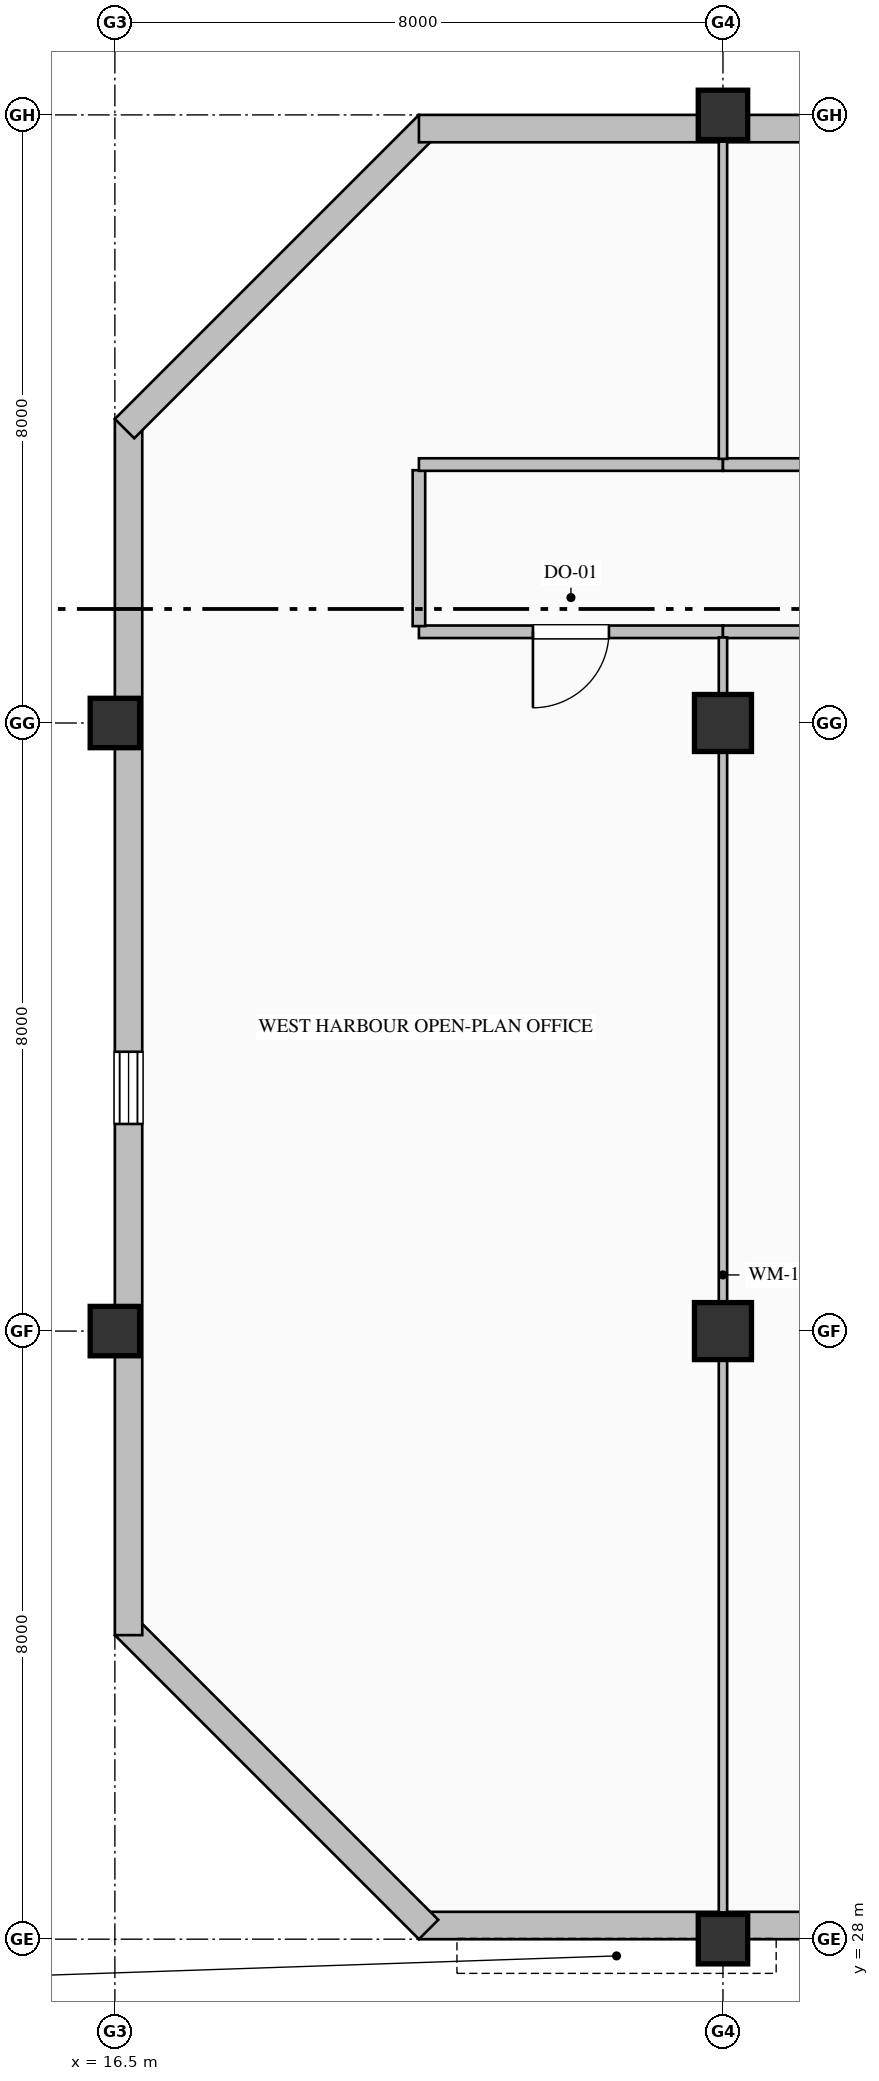
"""IFC4 building model, lengths in metres.
Left out: names, types, materials, properties, quantities, classifications, styles, units other than length and angle.
Written with IfcOpenShell. Run it as: python <this file> out.ifc"""

import sys

from ifc_helpers import new_model, si_unit, direction, frame, frame_2d, origin, origin_2d, place, context, subcontext, project, spatial, rectangle, hollow_rectangle, extrude, element, fill, save


model = new_model("IFC4")
c1 = context("Model", 3, precision=1e-05, world=origin(), true_north=direction((0.0, 1.0)))
c2 = subcontext(c1, "Body", "Model", "MODEL_VIEW")
j1 = project(units=[si_unit("LENGTHUNIT", "METRE"), si_unit("PLANEANGLEUNIT", "RADIAN")], contexts=[c1])
p1 = place(None, origin())
s1 = spatial("IfcSite", under=j1, at=p1, CompositionType="ELEMENT")
p2 = place(p1, origin())
s2 = spatial("IfcBuilding", under=s1, at=p2, CompositionType="ELEMENT")
p3 = place(p2, frame((0.0, 0.0, 319.2)))
s3 = spatial("IfcBuildingStorey", under=s2, at=p3, CompositionType="ELEMENT", Elevation=319.2)
for number, where, z_axis, x_axis in (
    (1, (16.5, 36.0, 0.0), (0.0, 0.0, 1.0), (1.0, 0.0, 0.0)),
    (2, (16.5, 44.0, 0.0), (0.0, 0.0, 1.0), (1.0, 0.0, 0.0)),
    (3, (24.5, 28.0, 0.0), (0.0, 0.0, 1.0), (1.0, 0.0, 0.0)),
):
    element("IfcColumn", number, at=place(p3, frame(where, z_axis=z_axis, x_axis=x_axis)), inside=s3, PredefinedType="COLUMN", context=c2, shape_type="SweptSolid", body=[
        extrude(hollow_rectangle(XDim=0.65, YDim=0.65, WallThickness=0.028, at=origin_2d()), origin(), (0.0, 0.0, 1.0), 4.0),
    ])
for number, where, z_axis, x_axis in (
    (4, (24.5, 36.0, 0.0), (0.0, 0.0, 1.0), (1.0, 0.0, 0.0)),
    (5, (24.5, 44.0, 0.0), (0.0, 0.0, 1.0), (1.0, 0.0, 0.0)),
):
    element("IfcColumn", number, at=place(p3, frame(where, z_axis=z_axis, x_axis=x_axis)), inside=s3, PredefinedType="COLUMN", context=c2, shape_type="SweptSolid", body=[
        extrude(rectangle(XDim=0.75, YDim=0.75, at=origin_2d()), origin(), (0.0, 0.0, 1.0), 4.0),
    ])
p4 = place(p3, frame((24.5, 52.0, 0.0), z_axis=(0.0, 0.0, 1.0), x_axis=(1.0, 0.0, 0.0)))
e6 = element("IfcColumn", 6, at=p4, inside=s3, PredefinedType="COLUMN", context=c2, shape_type="SweptSolid", body=[
    extrude(hollow_rectangle(XDim=0.65, YDim=0.65, WallThickness=0.028, at=origin_2d()), origin(), (0.0, 0.0, 1.0), 4.0),
])
p5 = place(p3, frame((40.52, 28.18, 0.0), z_axis=(0.0, 0.0, 1.0), x_axis=(-1.0, 0.0, 0.0)))
e7 = element("IfcWall", 7, at=p5, inside=s3, PredefinedType="SOLIDWALL", context=c2, shape_type="SweptSolid", body=[
    extrude(rectangle(XDim=20.02, YDim=0.36, at=frame_2d((10.01, 0.0))), origin(), (0.0, 0.0, 1.0), 3.185),
])
p6 = place(p5, frame((3.125, 0.0, 0.9)))
e8 = element("IfcOpeningElement", 8, at=p6, cuts=e7, PredefinedType="OPENING", context=c2, shape_type="SweptSolid", body=[
    extrude(rectangle(XDim=0.95, YDim=1.85, at=frame_2d((0.475, 0.925))), frame((0.0, 0.19, 0.0), z_axis=(0.0, -1.0, 0.0), x_axis=(1.0, 0.0, 0.0)), (0.0, 0.0, 1.0), 0.38),
])
p7 = place(p5, frame((10.125, 0.0, 0.9)))
e9 = element("IfcOpeningElement", 9, at=p7, cuts=e7, PredefinedType="OPENING", context=c2, shape_type="SweptSolid", body=[
    extrude(rectangle(XDim=1.35, YDim=1.85, at=frame_2d((0.675, 0.925))), frame((0.0, 0.19, 0.0), z_axis=(0.0, -1.0, 0.0), x_axis=(1.0, 0.0, 0.0)), (0.0, 0.0, 1.0), 0.38),
])
p8 = place(p5, frame((13.925, 0.0, 0.9)))
e10 = element("IfcOpeningElement", 10, at=p8, cuts=e7, PredefinedType="OPENING", context=c2, shape_type="SweptSolid", body=[
    extrude(rectangle(XDim=0.95, YDim=1.85, at=frame_2d((0.475, 0.925))), frame((0.0, 0.19, 0.0), z_axis=(0.0, -1.0, 0.0), x_axis=(1.0, 0.0, 0.0)), (0.0, 0.0, 1.0), 0.38),
])
p9 = place(p3, frame((20.627, 28.127, 0.0), z_axis=(0.0, 0.0, 1.0), x_axis=(-0.707106781187, 0.707106781187, 0.0)))
e11 = element("IfcWall", 11, at=p9, inside=s3, PredefinedType="SOLIDWALL", context=c2, shape_type="SweptSolid", body=[
    extrude(rectangle(XDim=5.657, YDim=0.36, at=frame_2d((2.828, 0.0))), origin(), (0.0, 0.0, 1.0), 3.785),
])
p10 = place(p3, frame((16.68, 32.0, 0.0), z_axis=(0.0, 0.0, 1.0), x_axis=(0.0, 1.0, 0.0)))
e12 = element("IfcWall", 12, at=p10, inside=s3, PredefinedType="SOLIDWALL", context=c2, shape_type="SweptSolid", body=[
    extrude(rectangle(XDim=16.0, YDim=0.36, at=frame_2d((8.0, 0.0))), origin(), (0.0, 0.0, 1.0), 3.335),
])
p11 = place(p10, frame((6.725, 0.0, 0.9)))
e13 = element("IfcOpeningElement", 13, at=p11, cuts=e12, PredefinedType="OPENING", context=c2, shape_type="SweptSolid", body=[
    extrude(rectangle(XDim=0.95, YDim=1.85, at=frame_2d((0.475, 0.925))), frame((0.0, 0.19, 0.0), z_axis=(0.0, -1.0, 0.0), x_axis=(1.0, 0.0, 0.0)), (0.0, 0.0, 1.0), 0.38),
])
p12 = place(p3, frame((16.627, 47.873, 0.0), z_axis=(0.0, 0.0, 1.0), x_axis=(0.707106781187, 0.707106781187, 0.0)))
e14 = element("IfcWall", 14, at=p12, inside=s3, PredefinedType="SOLIDWALL", context=c2, shape_type="SweptSolid", body=[
    extrude(rectangle(XDim=5.657, YDim=0.36, at=frame_2d((2.828, 0.0))), origin(), (0.0, 0.0, 1.0), 3.785),
])
p13 = place(p3, frame((20.5, 51.82, 0.0), z_axis=(0.0, 0.0, 1.0), x_axis=(1.0, 0.0, 0.0)))
e15 = element("IfcWall", 15, at=p13, inside=s3, PredefinedType="SOLIDWALL", context=c2, shape_type="SweptSolid", body=[
    extrude(rectangle(XDim=20.02, YDim=0.36, at=frame_2d((10.01, 0.0))), origin(), (0.0, 0.0, 1.0), 3.335),
])
p14 = place(p13, frame((6.525, 0.0, 0.9)))
e16 = element("IfcOpeningElement", 16, at=p14, cuts=e15, PredefinedType="OPENING", context=c2, shape_type="SweptSolid", body=[
    extrude(rectangle(XDim=1.35, YDim=1.85, at=frame_2d((0.675, 0.925))), frame((0.0, 0.19, 0.0), z_axis=(0.0, -1.0, 0.0), x_axis=(1.0, 0.0, 0.0)), (0.0, 0.0, 1.0), 0.38),
])
p15 = place(p3, frame((24.5, 45.2, 0.0), z_axis=(0.0, 0.0, 1.0), x_axis=(-1.0, 0.0, 0.0)))
e17 = element("IfcWall", 17, at=p15, inside=s3, PredefinedType="PARTITIONING", context=c2, shape_type="SweptSolid", body=[
    extrude(rectangle(XDim=4.0, YDim=0.165, at=frame_2d((2.0, 0.0))), origin(), (0.0, 0.0, 1.0), 3.785),
])
p16 = place(p15, frame((1.5, 0.0, 0.0)))
e18 = element("IfcOpeningElement", 18, at=p16, cuts=e17, PredefinedType="OPENING", context=c2, shape_type="SweptSolid", body=[
    extrude(rectangle(XDim=1.0, YDim=2.15, at=frame_2d((0.5, 1.075))), frame((0.0, 0.093, 0.0), z_axis=(0.0, -1.0, 0.0), x_axis=(1.0, 0.0, 0.0)), (0.0, 0.0, 1.0), 0.185),
])
p17 = place(p3, frame((20.5, 45.274, 0.0), z_axis=(0.0, 0.0, 1.0), x_axis=(0.0, 1.0, 0.0)))
e19 = element("IfcWall", 19, at=p17, inside=s3, PredefinedType="PARTITIONING", context=c2, shape_type="SweptSolid", body=[
    extrude(rectangle(XDim=2.051, YDim=0.165, at=frame_2d((1.025, 0.0))), origin(), (0.0, 0.0, 1.0), 3.785),
])
p18 = place(p3, frame((20.5, 47.4, 0.0), z_axis=(0.0, 0.0, 1.0), x_axis=(1.0, 0.0, 0.0)))
e20 = element("IfcWall", 20, at=p18, inside=s3, PredefinedType="PARTITIONING", context=c2, shape_type="SweptSolid", body=[
    extrude(rectangle(XDim=4.0, YDim=0.165, at=frame_2d((2.0, 0.0))), origin(), (0.0, 0.0, 1.0), 3.785),
])
p19 = place(p3, frame((24.5, 47.4, 0.0), z_axis=(0.0, 0.0, 1.0), x_axis=(1.0, 0.0, 0.0)))
e21 = element("IfcWall", 21, at=p19, inside=s3, PredefinedType="PARTITIONING", context=c2, shape_type="SweptSolid", body=[
    extrude(rectangle(XDim=10.9, YDim=0.165, at=frame_2d((5.45, 0.0))), origin(), (0.0, 0.0, 1.0), 3.785),
])
p20 = place(p19, frame((5.0, 0.0, 0.0)))
e22 = element("IfcOpeningElement", 22, at=p20, cuts=e21, PredefinedType="OPENING", context=c2, shape_type="SweptSolid", body=[
    extrude(rectangle(XDim=0.9, YDim=2.15, at=frame_2d((0.45, 1.075))), frame((0.0, 0.093, 0.0), z_axis=(0.0, -1.0, 0.0), x_axis=(1.0, 0.0, 0.0)), (0.0, 0.0, 1.0), 0.185),
])
p21 = place(p3, frame((31.0, 45.2, 0.0), z_axis=(0.0, 0.0, 1.0), x_axis=(-1.0, 0.0, 0.0)))
e23 = element("IfcWall", 23, at=p21, inside=s3, PredefinedType="PARTITIONING", context=c2, shape_type="SweptSolid", body=[
    extrude(rectangle(XDim=6.5, YDim=0.165, at=frame_2d((3.25, 0.0))), origin(), (0.0, 0.0, 1.0), 3.785),
])
p22 = place(p21, frame((2.75, 0.0, 0.0)))
e24 = element("IfcOpeningElement", 24, at=p22, cuts=e23, PredefinedType="OPENING", context=c2, shape_type="SweptSolid", body=[
    extrude(rectangle(XDim=1.0, YDim=2.15, at=frame_2d((0.5, 1.075))), frame((0.0, 0.093, 0.0), z_axis=(0.0, -1.0, 0.0), x_axis=(1.0, 0.0, 0.0)), (0.0, 0.0, 1.0), 0.185),
])
p23 = place(p3, frame((24.5, 51.648, 0.0), z_axis=(0.0, 0.0, 1.0), x_axis=(0.0, -1.0, 0.0)))
e25 = element("IfcWall", 25, at=p23, inside=s3, PredefinedType="MOVABLE", context=c2, shape_type="SweptSolid", body=[
    extrude(rectangle(XDim=4.173, YDim=0.11, at=frame_2d((2.087, 0.0))), origin(), (0.0, 0.0, 1.0), 3.177),
])
p24 = place(p3, frame((24.5, 45.125, 0.0), z_axis=(0.0, 0.0, 1.0), x_axis=(0.0, -1.0, 0.0)))
e26 = element("IfcWall", 26, at=p24, inside=s3, PredefinedType="MOVABLE", context=c2, shape_type="SweptSolid", body=[
    extrude(rectangle(XDim=16.773, YDim=0.11, at=frame_2d((8.387, 0.0))), origin(), (0.0, 0.0, 1.0), 3.177),
])
p25 = place(p11, origin())
e27 = element("IfcWindow", 27, at=p25, inside=s3, PartitioningType="SINGLE_PANEL", PredefinedType="WINDOW", context=c2, shape_type="SweptSolid", body=[
    extrude(rectangle(XDim=0.95, YDim=1.85, at=frame_2d((0.475, 0.925))), frame((0.0, 0.15, 0.0), z_axis=(0.0, -1.0, 0.0), x_axis=(1.0, 0.0, 0.0)), (0.0, 0.0, 1.0), 0.06),
])
fill(e13, e27)
p26 = place(p16, origin())
e28 = element("IfcDoor", 28, at=p26, inside=s3, OperationType="SINGLE_SWING_RIGHT", PredefinedType="DOOR", context=c2, shape_type="SweptSolid", body=[
    extrude(rectangle(XDim=1.0, YDim=2.15, at=frame_2d((0.5, 1.075))), frame((0.0, 0.025, 0.0), z_axis=(0.0, -1.0, 0.0), x_axis=(1.0, 0.0, 0.0)), (0.0, 0.0, 1.0), 0.05),
])
fill(e18, e28)
save(model, sys.argv[1])
